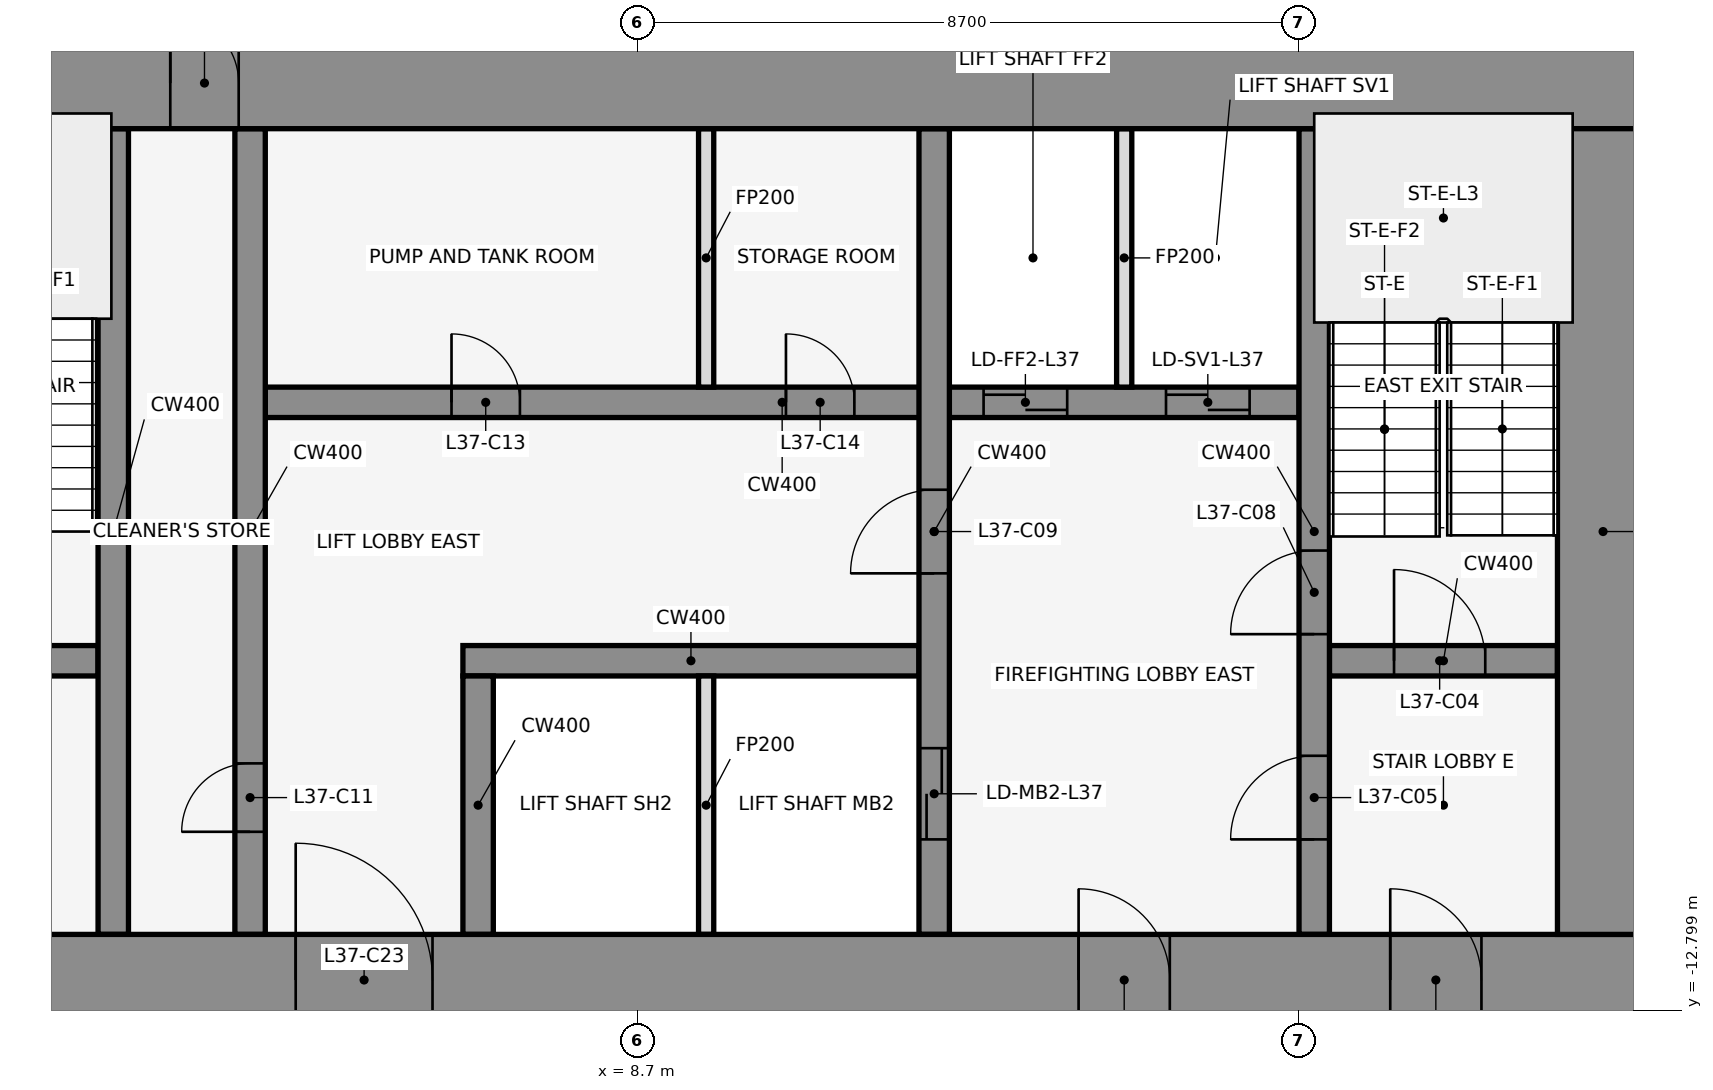
"""IFC4 building model, lengths in metres.
Left out: names, types, materials, properties, quantities, classifications, styles, units other than length and angle.
Written with IfcOpenShell. Run it as: python <this file> out.ifc"""

import sys

from ifc_helpers import new_model, si_unit, direction, frame, frame_2d, origin, place, context, subcontext, project, spatial, rectangle, extrude, element, fill, save


model = new_model("IFC4")
c1 = context("Model", 3, precision=1e-05, world=origin(), true_north=direction((0.0, 1.0)))
c2 = subcontext(c1, "Body", "Model", "MODEL_VIEW")
j1 = project(units=[si_unit("LENGTHUNIT", "METRE"), si_unit("PLANEANGLEUNIT", "RADIAN")], contexts=[c1])
p1 = place(None, origin())
s1 = spatial("IfcSite", under=j1, at=p1, CompositionType="ELEMENT")
p2 = place(p1, origin())
s2 = spatial("IfcBuilding", under=s1, at=p2, CompositionType="ELEMENT")
p3 = place(p2, frame((0.0, 0.0, 169.1)))
s3 = spatial("IfcBuildingStorey", under=s2, at=p3, CompositionType="ELEMENT", Elevation=169.1)
for number, where, z_axis, x_axis in (
    (1, (16.432, -0.105, 0.0), (0.0, 0.0, 1.0), (-0.84, 0.543, 0.0)),
    (2, (1.901, 1.08, 0.0), (0.0, 0.0, 1.0), (-0.84, -0.543, 0.0)),
):
    element("IfcWall", number, at=place(p3, frame(where, z_axis=z_axis, x_axis=x_axis)), inside=s3, PredefinedType="STANDARD", context=c2, shape_type="SweptSolid", body=[
        extrude(rectangle(XDim=2.183, YDim=0.25, at=frame_2d((1.091, 0.0))), origin(), (0.0, 0.0, 1.0), 3.95),
    ])
p4 = place(p3, frame((-1.6, -8.2, 0.0), z_axis=(0.0, 0.0, 1.0), x_axis=(1.0, 0.0, 0.0)))
e3 = element("IfcWall", 3, at=p4, inside=s3, PredefinedType="SHEAR", context=c2, shape_type="SweptSolid", body=[
    extrude(rectangle(XDim=3.2, YDim=0.4, at=frame_2d((1.6, 0.0))), origin(), (0.0, 0.0, 1.0), 4.1),
])
p5 = place(p4, frame((1.05, 0.0, 0.0)))
e4 = element("IfcOpeningElement", 4, at=p5, cuts=e3, PredefinedType="OPENING", context=c2, shape_type="SweptSolid", body=[
    extrude(rectangle(XDim=1.2, YDim=2.1, at=frame_2d((0.6, 1.05))), frame((0.0, 0.212, 0.0), z_axis=(0.0, -1.0, 0.0), x_axis=(1.0, 0.0, 0.0)), (0.0, 0.0, 1.0), 0.424),
])
p6 = place(p3, frame((6.4, -8.2, 0.0), z_axis=(0.0, 0.0, 1.0), x_axis=(1.0, 0.0, 0.0)))
e5 = element("IfcWall", 5, at=p6, inside=s3, PredefinedType="SHEAR", context=c2, shape_type="SweptSolid", body=[
    extrude(rectangle(XDim=6.0, YDim=0.4, at=frame_2d((3.0, 0.0))), origin(), (0.0, 0.0, 1.0), 4.1),
])
p7 = place(p3, frame((17.8, -8.2, 0.0), z_axis=(0.0, 0.0, 1.0), x_axis=(1.0, 0.0, 0.0)))
e6 = element("IfcWall", 6, at=p7, inside=s3, PredefinedType="SHEAR", context=c2, shape_type="SweptSolid", body=[
    extrude(rectangle(XDim=3.0, YDim=0.4, at=frame_2d((1.5, 0.0))), origin(), (0.0, 0.0, 1.0), 4.1),
])
p8 = place(p7, frame((0.85, 0.0, 0.0)))
e7 = element("IfcOpeningElement", 7, at=p8, cuts=e6, PredefinedType="OPENING", context=c2, shape_type="SweptSolid", body=[
    extrude(rectangle(XDim=1.2, YDim=2.1, at=frame_2d((0.6, 1.05))), frame((0.0, 0.212, 0.0), z_axis=(0.0, -1.0, 0.0), x_axis=(1.0, 0.0, 0.0)), (0.0, 0.0, 1.0), 0.424),
])
p9 = place(p3, frame((3.8, -4.8, 0.0), z_axis=(0.0, 0.0, 1.0), x_axis=(1.0, 0.0, 0.0)))
e8 = element("IfcWall", 8, at=p9, inside=s3, PredefinedType="SHEAR", context=c2, shape_type="SweptSolid", body=[
    extrude(rectangle(XDim=13.6, YDim=0.4, at=frame_2d((6.8, 0.0))), origin(), (0.0, 0.0, 1.0), 4.1),
])
p10 = place(p9, frame((9.45, 0.0, 0.0)))
e9 = element("IfcOpeningElement", 9, at=p10, cuts=e8, PredefinedType="OPENING", context=c2, shape_type="SweptSolid", body=[
    extrude(rectangle(XDim=1.1, YDim=2.1, at=frame_2d((0.55, 1.05))), frame((0.0, 0.212, 0.0), z_axis=(0.0, -1.0, 0.0), x_axis=(1.0, 0.0, 0.0)), (0.0, 0.0, 1.0), 0.424),
])
p11 = place(p9, frame((11.85, 0.0, 0.0)))
e10 = element("IfcOpeningElement", 10, at=p11, cuts=e8, PredefinedType="OPENING", context=c2, shape_type="SweptSolid", body=[
    extrude(rectangle(XDim=1.1, YDim=2.1, at=frame_2d((0.55, 1.05))), frame((0.0, 0.212, 0.0), z_axis=(0.0, -1.0, 0.0), x_axis=(1.0, 0.0, 0.0)), (0.0, 0.0, 1.0), 0.424),
])
p12 = place(p9, frame((2.45, 0.0, 0.0)))
e11 = element("IfcOpeningElement", 11, at=p12, cuts=e8, PredefinedType="OPENING", context=c2, shape_type="SweptSolid", body=[
    extrude(rectangle(XDim=0.9, YDim=2.1, at=frame_2d((0.45, 1.05))), frame((0.0, 0.212, 0.0), z_axis=(0.0, -1.0, 0.0), x_axis=(1.0, 0.0, 0.0)), (0.0, 0.0, 1.0), 0.424),
])
p13 = place(p9, frame((6.85, 0.0, 0.0)))
e12 = element("IfcOpeningElement", 12, at=p13, cuts=e8, PredefinedType="OPENING", context=c2, shape_type="SweptSolid", body=[
    extrude(rectangle(XDim=0.9, YDim=2.1, at=frame_2d((0.45, 1.05))), frame((0.0, 0.212, 0.0), z_axis=(0.0, -1.0, 0.0), x_axis=(1.0, 0.0, 0.0)), (0.0, 0.0, 1.0), 0.424),
])
p14 = place(p3, frame((1.8, -11.8, 0.0), z_axis=(0.0, 0.0, 1.0), x_axis=(0.0, 1.0, 0.0)))
e13 = element("IfcWall", 13, at=p14, inside=s3, PredefinedType="SHEAR", context=c2, shape_type="SweptSolid", body=[
    extrude(rectangle(XDim=10.6, YDim=0.4, at=frame_2d((5.3, 0.0))), origin(), (0.0, 0.0, 1.0), 4.1),
])
p15 = place(p3, frame((3.6, -11.8, 0.0), z_axis=(0.0, 0.0, 1.0), x_axis=(0.0, 1.0, 0.0)))
e14 = element("IfcWall", 14, at=p15, inside=s3, PredefinedType="SHEAR", context=c2, shape_type="SweptSolid", body=[
    extrude(rectangle(XDim=10.6, YDim=0.4, at=frame_2d((5.3, 0.0))), origin(), (0.0, 0.0, 1.0), 4.1),
])
p16 = place(p15, frame((1.35, 0.0, 0.0)))
e15 = element("IfcOpeningElement", 15, at=p16, cuts=e14, PredefinedType="OPENING", context=c2, shape_type="SweptSolid", body=[
    extrude(rectangle(XDim=0.9, YDim=2.1, at=frame_2d((0.45, 1.05))), frame((0.0, 0.212, 0.0), z_axis=(0.0, -1.0, 0.0), x_axis=(1.0, 0.0, 0.0)), (0.0, 0.0, 1.0), 0.424),
])
p17 = place(p3, frame((6.6, -11.8, 0.0), z_axis=(0.0, 0.0, 1.0), x_axis=(0.0, 1.0, 0.0)))
e16 = element("IfcWall", 16, at=p17, inside=s3, PredefinedType="SHEAR", context=c2, shape_type="SweptSolid", body=[
    extrude(rectangle(XDim=3.4, YDim=0.4, at=frame_2d((1.7, 0.0))), origin(), (0.0, 0.0, 1.0), 4.1),
])
for number, where, z_axis, x_axis in (
    (17, (9.6, -11.8, 0.0), (0.0, 0.0, 1.0), (0.0, 1.0, 0.0)),
    (18, (9.6, -4.6, 0.0), (0.0, 0.0, 1.0), (0.0, 1.0, 0.0)),
):
    element("IfcWall", number, at=place(p3, frame(where, z_axis=z_axis, x_axis=x_axis)), inside=s3, PredefinedType="PARTITIONING", context=c2, shape_type="SweptSolid", body=[
        extrude(rectangle(XDim=3.4, YDim=0.2, at=frame_2d((1.7, 0.0))), origin(), (0.0, 0.0, 1.0), 2.84),
    ])
p18 = place(p3, frame((12.6, -11.8, 0.0), z_axis=(0.0, 0.0, 1.0), x_axis=(0.0, 1.0, 0.0)))
e19 = element("IfcWall", 19, at=p18, inside=s3, PredefinedType="SHEAR", context=c2, shape_type="SweptSolid", body=[
    extrude(rectangle(XDim=10.6, YDim=0.4, at=frame_2d((5.3, 0.0))), origin(), (0.0, 0.0, 1.0), 4.1),
])
p19 = place(p18, frame((1.25, 0.0, 0.0)))
e20 = element("IfcOpeningElement", 20, at=p19, cuts=e19, PredefinedType="OPENING", context=c2, shape_type="SweptSolid", body=[
    extrude(rectangle(XDim=1.2, YDim=2.1, at=frame_2d((0.6, 1.05))), frame((0.0, 0.212, 0.0), z_axis=(0.0, -1.0, 0.0), x_axis=(1.0, 0.0, 0.0)), (0.0, 0.0, 1.0), 0.424),
])
p20 = place(p18, frame((4.75, 0.0, 0.0)))
e21 = element("IfcOpeningElement", 21, at=p20, cuts=e19, PredefinedType="OPENING", context=c2, shape_type="SweptSolid", body=[
    extrude(rectangle(XDim=1.1, YDim=2.1, at=frame_2d((0.55, 1.05))), frame((0.0, 0.212, 0.0), z_axis=(0.0, -1.0, 0.0), x_axis=(1.0, 0.0, 0.0)), (0.0, 0.0, 1.0), 0.424),
])
p21 = place(p3, frame((15.1, -4.6, 0.0), z_axis=(0.0, 0.0, 1.0), x_axis=(0.0, 1.0, 0.0)))
e22 = element("IfcWall", 22, at=p21, inside=s3, PredefinedType="PARTITIONING", context=c2, shape_type="SweptSolid", body=[
    extrude(rectangle(XDim=3.4, YDim=0.2, at=frame_2d((1.7, 0.0))), origin(), (0.0, 0.0, 1.0), 2.84),
])
p22 = place(p3, frame((17.6, -11.8, 0.0), z_axis=(0.0, 0.0, 1.0), x_axis=(0.0, 1.0, 0.0)))
e23 = element("IfcWall", 23, at=p22, inside=s3, PredefinedType="SHEAR", context=c2, shape_type="SweptSolid", body=[
    extrude(rectangle(XDim=10.6, YDim=0.4, at=frame_2d((5.3, 0.0))), origin(), (0.0, 0.0, 1.0), 4.1),
])
p23 = place(p22, frame((1.25, 0.0, 0.0)))
e24 = element("IfcOpeningElement", 24, at=p23, cuts=e23, PredefinedType="OPENING", context=c2, shape_type="SweptSolid", body=[
    extrude(rectangle(XDim=1.1, YDim=2.1, at=frame_2d((0.55, 1.05))), frame((0.0, 0.212, 0.0), z_axis=(0.0, -1.0, 0.0), x_axis=(1.0, 0.0, 0.0)), (0.0, 0.0, 1.0), 0.424),
])
p24 = place(p22, frame((3.95, 0.0, 0.0)))
e25 = element("IfcOpeningElement", 25, at=p24, cuts=e23, PredefinedType="OPENING", context=c2, shape_type="SweptSolid", body=[
    extrude(rectangle(XDim=1.1, YDim=2.1, at=frame_2d((0.55, 1.05))), frame((0.0, 0.212, 0.0), z_axis=(0.0, -1.0, 0.0), x_axis=(1.0, 0.0, 0.0)), (0.0, 0.0, 1.0), 0.424),
])
p25 = place(p3, frame((-22.0, -0.6, 0.0), z_axis=(0.0, 0.0, 1.0), x_axis=(1.0, 0.0, 0.0)))
e26 = element("IfcWall", 26, at=p25, inside=s3, PredefinedType="SHEAR", context=c2, shape_type="SweptSolid", body=[
    extrude(rectangle(XDim=44.0, YDim=1.2, at=frame_2d((22.0, 0.0))), origin(), (0.0, 0.0, 1.0), 4.1),
])
p26 = place(p25, frame((18.55, 0.0, 0.0)))
e27 = element("IfcOpeningElement", 27, at=p26, cuts=e26, PredefinedType="OPENING", context=c2, shape_type="SweptSolid", body=[
    extrude(rectangle(XDim=0.9, YDim=2.1, at=frame_2d((0.45, 1.05))), frame((0.0, 0.612, 0.0), z_axis=(0.0, -1.0, 0.0), x_axis=(1.0, 0.0, 0.0)), (0.0, 0.0, 1.0), 1.224),
])
p27 = place(p25, frame((24.55, 0.0, 0.0)))
e28 = element("IfcOpeningElement", 28, at=p27, cuts=e26, PredefinedType="OPENING", context=c2, shape_type="SweptSolid", body=[
    extrude(rectangle(XDim=0.9, YDim=2.1, at=frame_2d((0.45, 1.05))), frame((0.0, 0.612, 0.0), z_axis=(0.0, -1.0, 0.0), x_axis=(1.0, 0.0, 0.0)), (0.0, 0.0, 1.0), 1.224),
])
p28 = place(p3, frame((-22.0, -12.4, 0.0), z_axis=(0.0, 0.0, 1.0), x_axis=(1.0, 0.0, 0.0)))
e29 = element("IfcWall", 29, at=p28, inside=s3, PredefinedType="SHEAR", context=c2, shape_type="SweptSolid", body=[
    extrude(rectangle(XDim=44.0, YDim=1.2, at=frame_2d((22.0, 0.0))), origin(), (0.0, 0.0, 1.0), 4.1),
])
p29 = place(p28, frame((2.2, 0.0, 0.0)))
e30 = element("IfcOpeningElement", 30, at=p29, cuts=e29, PredefinedType="OPENING", context=c2, shape_type="SweptSolid", body=[
    extrude(rectangle(XDim=1.2, YDim=2.1, at=frame_2d((0.6, 1.05))), frame((0.0, 0.612, 0.0), z_axis=(0.0, -1.0, 0.0), x_axis=(1.0, 0.0, 0.0)), (0.0, 0.0, 1.0), 1.224),
])
p30 = place(p28, frame((21.4, 0.0, 0.0)))
e31 = element("IfcOpeningElement", 31, at=p30, cuts=e29, PredefinedType="OPENING", context=c2, shape_type="SweptSolid", body=[
    extrude(rectangle(XDim=1.2, YDim=2.1, at=frame_2d((0.6, 1.05))), frame((0.0, 0.612, 0.0), z_axis=(0.0, -1.0, 0.0), x_axis=(1.0, 0.0, 0.0)), (0.0, 0.0, 1.0), 1.224),
])
p31 = place(p28, frame((40.6, 0.0, 0.0)))
e32 = element("IfcOpeningElement", 32, at=p31, cuts=e29, PredefinedType="OPENING", context=c2, shape_type="SweptSolid", body=[
    extrude(rectangle(XDim=1.2, YDim=2.1, at=frame_2d((0.6, 1.05))), frame((0.0, 0.612, 0.0), z_axis=(0.0, -1.0, 0.0), x_axis=(1.0, 0.0, 0.0)), (0.0, 0.0, 1.0), 1.224),
])
p32 = place(p28, frame((16.0, 0.0, 0.0)))
e33 = element("IfcOpeningElement", 33, at=p32, cuts=e29, PredefinedType="OPENING", context=c2, shape_type="SweptSolid", body=[
    extrude(rectangle(XDim=1.8, YDim=2.1, at=frame_2d((0.9, 1.05))), frame((0.0, 0.612, 0.0), z_axis=(0.0, -1.0, 0.0), x_axis=(1.0, 0.0, 0.0)), (0.0, 0.0, 1.0), 1.224),
])
p33 = place(p28, frame((6.3, 0.0, 0.0)))
e34 = element("IfcOpeningElement", 34, at=p33, cuts=e29, PredefinedType="OPENING", context=c2, shape_type="SweptSolid", body=[
    extrude(rectangle(XDim=1.2, YDim=2.1, at=frame_2d((0.6, 1.05))), frame((0.0, 0.612, 0.0), z_axis=(0.0, -1.0, 0.0), x_axis=(1.0, 0.0, 0.0)), (0.0, 0.0, 1.0), 1.224),
])
p34 = place(p28, frame((26.2, 0.0, 0.0)))
e35 = element("IfcOpeningElement", 35, at=p34, cuts=e29, PredefinedType="OPENING", context=c2, shape_type="SweptSolid", body=[
    extrude(rectangle(XDim=1.8, YDim=2.1, at=frame_2d((0.9, 1.05))), frame((0.0, 0.612, 0.0), z_axis=(0.0, -1.0, 0.0), x_axis=(1.0, 0.0, 0.0)), (0.0, 0.0, 1.0), 1.224),
])
p35 = place(p28, frame((36.5, 0.0, 0.0)))
e36 = element("IfcOpeningElement", 36, at=p35, cuts=e29, PredefinedType="OPENING", context=c2, shape_type="SweptSolid", body=[
    extrude(rectangle(XDim=1.2, YDim=2.1, at=frame_2d((0.6, 1.05))), frame((0.0, 0.612, 0.0), z_axis=(0.0, -1.0, 0.0), x_axis=(1.0, 0.0, 0.0)), (0.0, 0.0, 1.0), 1.224),
])
p36 = place(p3, frame((21.4, -11.8, 0.0), z_axis=(0.0, 0.0, 1.0), x_axis=(0.0, 1.0, 0.0)))
e37 = element("IfcWall", 37, at=p36, inside=s3, PredefinedType="SHEAR", context=c2, shape_type="SweptSolid", body=[
    extrude(rectangle(XDim=10.6, YDim=1.2, at=frame_2d((5.3, 0.0))), origin(), (0.0, 0.0, 1.0), 4.1),
])
p37 = place(p8, origin())
e38 = element("IfcDoor", 38, at=p37, inside=s3, OperationType="SINGLE_SWING_RIGHT", PredefinedType="DOOR", context=c2, shape_type="SweptSolid", body=[
    extrude(rectangle(XDim=1.2, YDim=2.1, at=frame_2d((0.6, 1.05))), frame((0.0, 0.025, 0.0), z_axis=(0.0, -1.0, 0.0), x_axis=(1.0, 0.0, 0.0)), (0.0, 0.0, 1.0), 0.05),
])
fill(e7, e38)
p38 = place(p23, origin())
e39 = element("IfcDoor", 39, at=p38, inside=s3, OperationType="SINGLE_SWING_LEFT", PredefinedType="DOOR", context=c2, shape_type="SweptSolid", body=[
    extrude(rectangle(XDim=1.1, YDim=2.1, at=frame_2d((0.55, 1.05))), frame((0.0, 0.025, 0.0), z_axis=(0.0, -1.0, 0.0), x_axis=(1.0, 0.0, 0.0)), (0.0, 0.0, 1.0), 0.05),
])
fill(e24, e39)
p39 = place(p19, origin())
e40 = element("IfcDoor", 40, at=p39, inside=s3, OperationType="DOUBLE_DOOR_SLIDING", PredefinedType="DOOR", context=c2, shape_type="SweptSolid", body=[
    extrude(rectangle(XDim=1.2, YDim=2.1, at=frame_2d((0.6, 1.05))), frame((0.0, 0.025, 0.0), z_axis=(0.0, -1.0, 0.0), x_axis=(1.0, 0.0, 0.0)), (0.0, 0.0, 1.0), 0.05),
])
fill(e20, e40)
p40 = place(p10, origin())
e41 = element("IfcDoor", 41, at=p40, inside=s3, OperationType="DOUBLE_DOOR_SLIDING", PredefinedType="DOOR", context=c2, shape_type="SweptSolid", body=[
    extrude(rectangle(XDim=1.1, YDim=2.1, at=frame_2d((0.55, 1.05))), frame((0.0, 0.025, 0.0), z_axis=(0.0, -1.0, 0.0), x_axis=(1.0, 0.0, 0.0)), (0.0, 0.0, 1.0), 0.05),
])
fill(e9, e41)
p41 = place(p11, origin())
e42 = element("IfcDoor", 42, at=p41, inside=s3, OperationType="DOUBLE_DOOR_SLIDING", PredefinedType="DOOR", context=c2, shape_type="SweptSolid", body=[
    extrude(rectangle(XDim=1.1, YDim=2.1, at=frame_2d((0.55, 1.05))), frame((0.0, 0.025, 0.0), z_axis=(0.0, -1.0, 0.0), x_axis=(1.0, 0.0, 0.0)), (0.0, 0.0, 1.0), 0.05),
])
fill(e10, e42)
p42 = place(p24, origin())
e43 = element("IfcDoor", 43, at=p42, inside=s3, OperationType="SINGLE_SWING_RIGHT", PredefinedType="DOOR", context=c2, shape_type="SweptSolid", body=[
    extrude(rectangle(XDim=1.1, YDim=2.1, at=frame_2d((0.55, 1.05))), frame((0.0, 0.025, 0.0), z_axis=(0.0, -1.0, 0.0), x_axis=(1.0, 0.0, 0.0)), (0.0, 0.0, 1.0), 0.05),
])
fill(e25, e43)
p43 = place(p20, frame((1.1, 0.0, 0.0), z_axis=(0.0, 0.0, 1.0), x_axis=(-1.0, 0.0, 0.0)))
e44 = element("IfcDoor", 44, at=p43, inside=s3, OperationType="SINGLE_SWING_RIGHT", PredefinedType="DOOR", context=c2, shape_type="SweptSolid", body=[
    extrude(rectangle(XDim=1.1, YDim=2.1, at=frame_2d((0.55, 1.05))), frame((0.0, 0.025, 0.0), z_axis=(0.0, -1.0, 0.0), x_axis=(1.0, 0.0, 0.0)), (0.0, 0.0, 1.0), 0.05),
])
fill(e21, e44)
p44 = place(p16, origin())
e45 = element("IfcDoor", 45, at=p44, inside=s3, OperationType="SINGLE_SWING_LEFT", PredefinedType="DOOR", context=c2, shape_type="SweptSolid", body=[
    extrude(rectangle(XDim=0.9, YDim=2.1, at=frame_2d((0.45, 1.05))), frame((0.0, 0.025, 0.0), z_axis=(0.0, -1.0, 0.0), x_axis=(1.0, 0.0, 0.0)), (0.0, 0.0, 1.0), 0.05),
])
fill(e15, e45)
p45 = place(p12, origin())
e46 = element("IfcDoor", 46, at=p45, inside=s3, OperationType="SINGLE_SWING_LEFT", PredefinedType="DOOR", context=c2, shape_type="SweptSolid", body=[
    extrude(rectangle(XDim=0.9, YDim=2.1, at=frame_2d((0.45, 1.05))), frame((0.0, 0.025, 0.0), z_axis=(0.0, -1.0, 0.0), x_axis=(1.0, 0.0, 0.0)), (0.0, 0.0, 1.0), 0.05),
])
fill(e11, e46)
p46 = place(p13, origin())
e47 = element("IfcDoor", 47, at=p46, inside=s3, OperationType="SINGLE_SWING_RIGHT", PredefinedType="DOOR", context=c2, shape_type="SweptSolid", body=[
    extrude(rectangle(XDim=0.9, YDim=2.1, at=frame_2d((0.45, 1.05))), frame((0.0, 0.025, 0.0), z_axis=(0.0, -1.0, 0.0), x_axis=(1.0, 0.0, 0.0)), (0.0, 0.0, 1.0), 0.05),
])
fill(e12, e47)
p47 = place(p27, origin())
e48 = element("IfcDoor", 48, at=p47, inside=s3, OperationType="SINGLE_SWING_LEFT", PredefinedType="DOOR", context=c2, shape_type="SweptSolid", body=[
    extrude(rectangle(XDim=0.9, YDim=2.1, at=frame_2d((0.45, 1.05))), frame((0.0, 0.025, 0.0), z_axis=(0.0, -1.0, 0.0), x_axis=(1.0, 0.0, 0.0)), (0.0, 0.0, 1.0), 0.05),
])
fill(e28, e48)
p48 = place(p31, frame((1.2, 0.0, 0.0), z_axis=(0.0, 0.0, 1.0), x_axis=(-1.0, 0.0, 0.0)))
e49 = element("IfcDoor", 49, at=p48, inside=s3, OperationType="SINGLE_SWING_RIGHT", PredefinedType="DOOR", context=c2, shape_type="SweptSolid", body=[
    extrude(rectangle(XDim=1.2, YDim=2.1, at=frame_2d((0.6, 1.05))), frame((0.0, 0.025, 0.0), z_axis=(0.0, -1.0, 0.0), x_axis=(1.0, 0.0, 0.0)), (0.0, 0.0, 1.0), 0.05),
])
fill(e32, e49)
p49 = place(p34, origin())
e50 = element("IfcDoor", 50, at=p49, inside=s3, OperationType="SINGLE_SWING_LEFT", PredefinedType="DOOR", context=c2, shape_type="SweptSolid", body=[
    extrude(rectangle(XDim=1.8, YDim=2.1, at=frame_2d((0.9, 1.05))), frame((0.0, 0.025, 0.0), z_axis=(0.0, -1.0, 0.0), x_axis=(1.0, 0.0, 0.0)), (0.0, 0.0, 1.0), 0.05),
])
fill(e35, e50)
p50 = place(p35, frame((1.2, 0.0, 0.0), z_axis=(0.0, 0.0, 1.0), x_axis=(-1.0, 0.0, 0.0)))
e51 = element("IfcDoor", 51, at=p50, inside=s3, OperationType="SINGLE_SWING_RIGHT", PredefinedType="DOOR", context=c2, shape_type="SweptSolid", body=[
    extrude(rectangle(XDim=1.2, YDim=2.1, at=frame_2d((0.6, 1.05))), frame((0.0, 0.025, 0.0), z_axis=(0.0, -1.0, 0.0), x_axis=(1.0, 0.0, 0.0)), (0.0, 0.0, 1.0), 0.05),
])
fill(e36, e51)
save(model, sys.argv[1])
